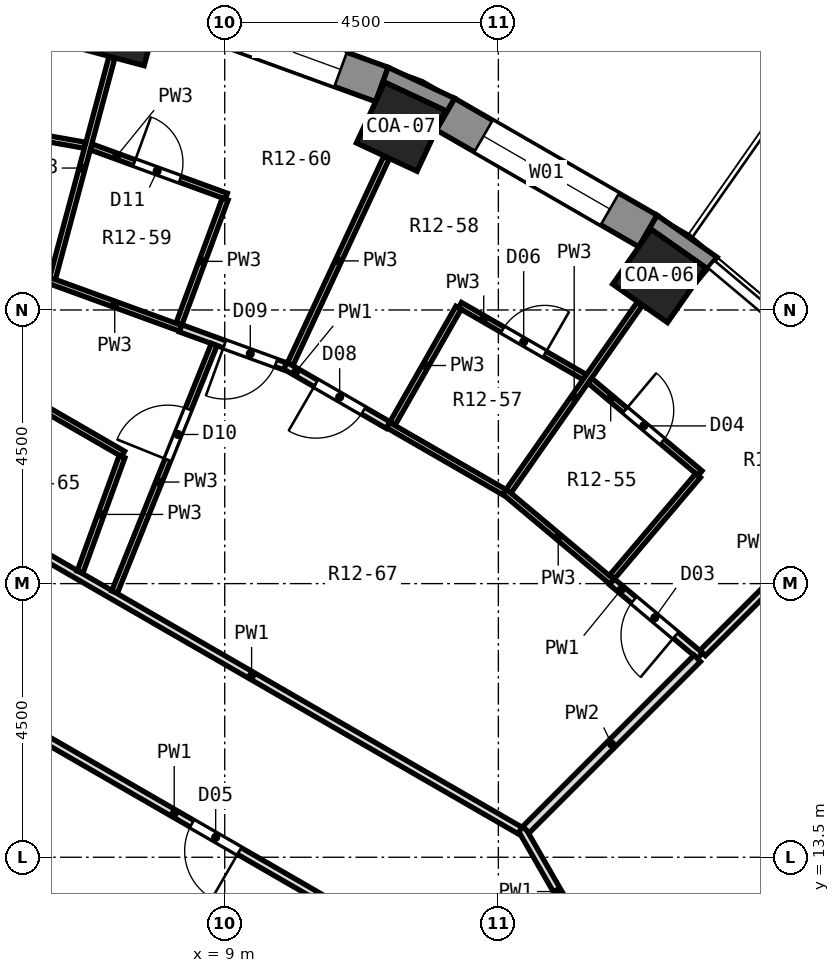
"""IFC4 building model, lengths in metres.
Left out: names, types, materials, properties, quantities, classifications, styles, units other than length and angle.
Written with IfcOpenShell. Run it as: python <this file> out.ifc"""

import sys

from ifc_helpers import new_model, si_unit, direction, frame, frame_2d, origin, origin_2d, place, context, subcontext, project, spatial, polyline, rectangle, outline, extrude, element, fill, save


model = new_model("IFC4")
c1 = context("Model", 3, precision=1e-05, world=origin(), true_north=direction((0.0, 1.0)))
c2 = subcontext(c1, "Body", "Model", "MODEL_VIEW")
j1 = project(units=[si_unit("LENGTHUNIT", "METRE"), si_unit("PLANEANGLEUNIT", "RADIAN")], contexts=[c1])
p1 = place(None, origin())
s1 = spatial("IfcSite", under=j1, at=p1, CompositionType="ELEMENT")
p2 = place(p1, origin())
s2 = spatial("IfcBuilding", under=s1, at=p2, CompositionType="ELEMENT")
p3 = place(p2, frame((0.0, 0.0, 56.0)))
s3 = spatial("IfcBuildingStorey", under=s2, at=p3, CompositionType="ELEMENT", Elevation=56.0)
for number, where, z_axis, x_axis in (
    (1, (16.146, 23.059, 0.0), (0.0, 0.0, 1.0), (0.574, 0.819, 0.0)),
    (2, (11.897, 25.512, 0.0), (0.0, 0.0, 1.0), (0.423, 0.906, 0.0)),
    (3, (7.286, 27.191, 0.0), (0.0, 0.0, 1.0), (0.259, 0.966, 0.0)),
):
    element("IfcColumn", number, at=place(p3, frame(where, z_axis=z_axis, x_axis=x_axis)), inside=s3, PredefinedType="COLUMN", context=c2, shape_type="SweptSolid", body=[
        extrude(rectangle(XDim=1.1, YDim=1.1, at=origin_2d()), origin(), (0.0, 0.0, 1.0), 3.3),
    ])
p4 = place(p3, frame((15.96, 23.798, 0.0), z_axis=(0.0, 0.0, 1.0), x_axis=(-0.86603124159, 0.499989888488, 0.0)))
e4 = element("IfcWall", 4, at=p4, inside=s3, PredefinedType="SOLIDWALL", context=c2, shape_type="SweptSolid", body=[
    extrude(rectangle(XDim=3.846, YDim=0.6, at=frame_2d((1.923, 0.0))), origin(), (0.0, 0.0, 1.0), 2.75),
])
p5 = place(p4, frame((0.723, 0.0, 0.9)))
e5 = element("IfcOpeningElement", 5, at=p5, cuts=e4, PredefinedType="OPENING", context=c2, shape_type="SweptSolid", body=[
    extrude(rectangle(XDim=2.4, YDim=1.8, at=frame_2d((1.2, 0.9))), frame((0.0, 0.312, 0.0), z_axis=(0.0, -1.0, 0.0), x_axis=(1.0, 0.0, 0.0)), (0.0, 0.0, 1.0), 0.624),
])
p6 = place(p3, frame((11.585, 26.208, 0.0), z_axis=(0.0, 0.0, 1.0), x_axis=(-0.939689588564, 0.342028474173, 0.0)))
e6 = element("IfcWall", 6, at=p6, inside=s3, PredefinedType="SOLIDWALL", context=c2, shape_type="SweptSolid", body=[
    extrude(rectangle(XDim=3.846, YDim=0.6, at=frame_2d((1.923, 0.0))), origin(), (0.0, 0.0, 1.0), 2.75),
])
p7 = place(p6, frame((0.723, 0.0, 0.9)))
e7 = element("IfcOpeningElement", 7, at=p7, cuts=e6, PredefinedType="OPENING", context=c2, shape_type="SweptSolid", body=[
    extrude(rectangle(XDim=2.4, YDim=1.8, at=frame_2d((1.2, 0.9))), frame((0.0, 0.312, 0.0), z_axis=(0.0, -1.0, 0.0), x_axis=(1.0, 0.0, 0.0)), (0.0, 0.0, 1.0), 0.624),
])
p8 = place(p3, origin())
e8 = element("IfcWall", 8, at=p8, inside=s3, PredefinedType="SOLIDWALL", context=c2, shape_type="SweptSolid", body=[
    extrude(outline(polyline([(17.097, 23.367), (16.11, 24.058), (15.81, 23.538), (16.011, 23.825), (16.912, 23.194), (16.711, 22.907), (17.097, 23.367)])), origin(), (0.0, 0.0, 1.0), 2.75),
])
p9 = place(p3, origin())
e9 = element("IfcWall", 9, at=p9, inside=s3, PredefinedType="SOLIDWALL", context=c2, shape_type="SweptSolid", body=[
    extrude(outline(polyline([(11.688, 26.49), (11.483, 25.926), (11.631, 26.243), (12.628, 25.779), (12.479, 25.461), (12.78, 25.981), (11.688, 26.49)])), origin(), (0.0, 0.0, 1.0), 2.75),
])
p10 = place(p3, frame((13.876, 13.976, 0.0), z_axis=(0.0, 0.0, 1.0), x_axis=(0.498306982451, -0.867000663921, 0.0)))
e10 = element("IfcWall", 10, at=p10, inside=s3, PredefinedType="PARTITIONING", context=c2, shape_type="SweptSolid", body=[
    extrude(rectangle(XDim=4.108, YDim=0.125, at=frame_2d((2.054, 0.0))), origin(), (0.0, 0.0, 1.0), 2.75),
])
p11 = place(p10, frame((1.623, 0.0, 0.0)))
e11 = element("IfcOpeningElement", 11, at=p11, cuts=e10, PredefinedType="OPENING", context=c2, shape_type="SweptSolid", body=[
    extrude(rectangle(XDim=1.0, YDim=2.1, at=frame_2d((0.5, 1.05))), frame((0.0, 0.074, 0.0), z_axis=(0.0, -1.0, 0.0), x_axis=(1.0, 0.0, 0.0)), (0.0, 0.0, 1.0), 0.149),
])
p12 = place(p3, frame((13.601, 19.513, 0.0), z_axis=(0.0, 0.0, 1.0), x_axis=(0.765838323525, -0.643033173499, 0.0)))
e12 = element("IfcWall", 12, at=p12, inside=s3, PredefinedType="PARTITIONING", context=c2, shape_type="SweptSolid", body=[
    extrude(rectangle(XDim=2.306, YDim=0.1, at=frame_2d((1.153, 0.0))), origin(), (0.0, 0.0, 1.0), 2.75),
])
p13 = place(p3, frame((15.367, 18.03, 0.0), z_axis=(0.0, 0.0, 1.0), x_axis=(0.766035589551, -0.64279816081, 0.0)))
e13 = element("IfcWall", 13, at=p13, inside=s3, PredefinedType="PARTITIONING", context=c2, shape_type="SweptSolid", body=[
    extrude(rectangle(XDim=1.89, YDim=0.125, at=frame_2d((0.945, 0.0))), origin(), (0.0, 0.0, 1.0), 2.75),
])
p14 = place(p13, frame((0.47, 0.0, 0.0)))
e14 = element("IfcOpeningElement", 14, at=p14, cuts=e13, PredefinedType="OPENING", context=c2, shape_type="SweptSolid", body=[
    extrude(rectangle(XDim=0.9, YDim=2.1, at=frame_2d((0.45, 1.05))), frame((0.0, 0.074, 0.0), z_axis=(0.0, -1.0, 0.0), x_axis=(1.0, 0.0, 0.0)), (0.0, 0.0, 1.0), 0.149),
])
p15 = place(p3, frame((15.002, 21.339, 0.0), z_axis=(0.0, 0.0, 1.0), x_axis=(0.765995095449, -0.642846415365, 0.0)))
e15 = element("IfcWall", 15, at=p15, inside=s3, PredefinedType="PARTITIONING", context=c2, shape_type="SweptSolid", body=[
    extrude(rectangle(XDim=2.369, YDim=0.1, at=frame_2d((1.185, 0.0))), origin(), (0.0, 0.0, 1.0), 2.75),
])
p16 = place(p15, frame((0.76, 0.0, 0.0)))
e16 = element("IfcOpeningElement", 16, at=p16, cuts=e15, PredefinedType="OPENING", context=c2, shape_type="SweptSolid", body=[
    extrude(rectangle(XDim=0.8, YDim=2.1, at=frame_2d((0.4, 1.05))), frame((0.0, 0.062, 0.0), z_axis=(0.0, -1.0, 0.0), x_axis=(1.0, 0.0, 0.0)), (0.0, 0.0, 1.0), 0.124),
])
p17 = place(p3, frame((4.332, 16.436, 0.0), z_axis=(0.0, 0.0, 1.0), x_axis=(0.866073188118, -0.499917225971, 0.0)))
e17 = element("IfcWall", 17, at=p17, inside=s3, PredefinedType="PARTITIONING", context=c2, shape_type="SweptSolid", body=[
    extrude(rectangle(XDim=8.861, YDim=0.125, at=frame_2d((4.431, 0.0))), origin(), (0.0, 0.0, 1.0), 2.75),
])
p18 = place(p17, frame((4.768, 0.0, 0.0)))
e18 = element("IfcOpeningElement", 18, at=p18, cuts=e17, PredefinedType="OPENING", context=c2, shape_type="SweptSolid", body=[
    extrude(rectangle(XDim=0.9, YDim=2.1, at=frame_2d((0.45, 1.05))), frame((0.0, 0.074, 0.0), z_axis=(0.0, -1.0, 0.0), x_axis=(1.0, 0.0, 0.0)), (0.0, 0.0, 1.0), 0.149),
])
p19 = place(p3, frame((5.029, 19.036, 0.0), z_axis=(0.0, 0.0, 1.0), x_axis=(0.866024825845, -0.50000100102, 0.0)))
e19 = element("IfcWall", 19, at=p19, inside=s3, PredefinedType="PARTITIONING", context=c2, shape_type="SweptSolid", body=[
    extrude(rectangle(XDim=10.192, YDim=0.125, at=frame_2d((5.096, 0.0))), origin(), (0.0, 0.0, 1.0), 2.75),
])
p20 = place(p3, frame((5.604, 21.129, 0.0), z_axis=(0.0, 0.0, 1.0), x_axis=(0.865901665176, -0.500214260339, 0.0)))
e20 = element("IfcWall", 20, at=p20, inside=s3, PredefinedType="PARTITIONING", context=c2, shape_type="SweptSolid", body=[
    extrude(rectangle(XDim=1.991, YDim=0.1, at=frame_2d((0.996, 0.0))), origin(), (0.0, 0.0, 1.0), 2.75),
])
p21 = place(p3, frame((11.687, 20.607, 0.0), z_axis=(0.0, 0.0, 1.0), x_axis=(0.866150561987, -0.499783156949, 0.0)))
e21 = element("IfcWall", 21, at=p21, inside=s3, PredefinedType="PARTITIONING", context=c2, shape_type="SweptSolid", body=[
    extrude(rectangle(XDim=2.205, YDim=0.1, at=frame_2d((1.103, 0.0))), origin(), (0.0, 0.0, 1.0), 2.75),
])
p22 = place(p3, frame((9.995, 21.584, 0.0), z_axis=(0.0, 0.0, 1.0), x_axis=(0.865996179119, -0.50005061519, 0.0)))
e22 = element("IfcWall", 22, at=p22, inside=s3, PredefinedType="PARTITIONING", context=c2, shape_type="SweptSolid", body=[
    extrude(rectangle(XDim=1.953, YDim=0.125, at=frame_2d((0.977, 0.0))), origin(), (0.0, 0.0, 1.0), 2.75),
])
p23 = place(p22, frame((0.583, 0.0, 0.0)))
e23 = element("IfcOpeningElement", 23, at=p23, cuts=e22, PredefinedType="OPENING", context=c2, shape_type="SweptSolid", body=[
    extrude(rectangle(XDim=0.9, YDim=2.1, at=frame_2d((0.45, 1.05))), frame((0.0, 0.074, 0.0), z_axis=(0.0, -1.0, 0.0), x_axis=(1.0, 0.0, 0.0)), (0.0, 0.0, 1.0), 0.149),
])
p24 = place(p3, frame((12.869, 22.58, 0.0), z_axis=(0.0, 0.0, 1.0), x_axis=(0.866116947413, -0.499841408252, 0.0)))
e24 = element("IfcWall", 24, at=p24, inside=s3, PredefinedType="PARTITIONING", context=c2, shape_type="SweptSolid", body=[
    extrude(rectangle(XDim=2.369, YDim=0.1, at=frame_2d((1.185, 0.0))), origin(), (0.0, 0.0, 1.0), 2.75),
])
p25 = place(p24, frame((0.809, 0.0, 0.0)))
e25 = element("IfcOpeningElement", 25, at=p25, cuts=e24, PredefinedType="OPENING", context=c2, shape_type="SweptSolid", body=[
    extrude(rectangle(XDim=0.8, YDim=2.1, at=frame_2d((0.4, 1.05))), frame((0.0, 0.062, 0.0), z_axis=(0.0, -1.0, 0.0), x_axis=(1.0, 0.0, 0.0)), (0.0, 0.0, 1.0), 0.124),
])
p26 = place(p3, frame((6.107, 22.987, 0.0), z_axis=(0.0, 0.0, 1.0), x_axis=(0.939734670151, -0.34190459154, 0.0)))
e26 = element("IfcWall", 26, at=p26, inside=s3, PredefinedType="PARTITIONING", context=c2, shape_type="SweptSolid", body=[
    extrude(rectangle(XDim=2.306, YDim=0.1, at=frame_2d((1.153, 0.0))), origin(), (0.0, 0.0, 1.0), 2.75),
])
p27 = place(p3, frame((8.274, 22.199, 0.0), z_axis=(0.0, 0.0, 1.0), x_axis=(0.939613884944, -0.342236390848, 0.0)))
e27 = element("IfcWall", 27, at=p27, inside=s3, PredefinedType="PARTITIONING", context=c2, shape_type="SweptSolid", body=[
    extrude(rectangle(XDim=1.828, YDim=0.125, at=frame_2d((0.914, 0.0))), origin(), (0.0, 0.0, 1.0), 2.75),
])
p28 = place(p27, frame((0.77, 0.0, 0.0)))
e28 = element("IfcOpeningElement", 28, at=p28, cuts=e27, PredefinedType="OPENING", context=c2, shape_type="SweptSolid", body=[
    extrude(rectangle(XDim=0.9, YDim=2.1, at=frame_2d((0.45, 1.05))), frame((0.0, 0.074, 0.0), z_axis=(0.0, -1.0, 0.0), x_axis=(1.0, 0.0, 0.0)), (0.0, 0.0, 1.0), 0.149),
])
p29 = place(p3, frame((6.799, 25.183, 0.0), z_axis=(0.0, 0.0, 1.0), x_axis=(0.939651971579, -0.342131805461, 0.0)))
e29 = element("IfcWall", 29, at=p29, inside=s3, PredefinedType="PARTITIONING", context=c2, shape_type="SweptSolid", body=[
    extrude(rectangle(XDim=2.37, YDim=0.1, at=frame_2d((1.185, 0.0))), origin(), (0.0, 0.0, 1.0), 2.75),
])
p30 = place(p29, frame((0.76, 0.0, 0.0)))
e30 = element("IfcOpeningElement", 30, at=p30, cuts=e29, PredefinedType="OPENING", context=c2, shape_type="SweptSolid", body=[
    extrude(rectangle(XDim=0.8, YDim=2.1, at=frame_2d((0.4, 1.05))), frame((0.0, 0.062, 0.0), z_axis=(0.0, -1.0, 0.0), x_axis=(1.0, 0.0, 0.0)), (0.0, 0.0, 1.0), 0.124),
])
p31 = place(p3, frame((4.37, 25.62, 0.0), z_axis=(0.0, 0.0, 1.0), x_axis=(0.984804303523, -0.173667739554, 0.0)))
e31 = element("IfcWall", 31, at=p31, inside=s3, PredefinedType="PARTITIONING", context=c2, shape_type="SweptSolid", body=[
    extrude(rectangle(XDim=2.369, YDim=0.1, at=frame_2d((1.184, 0.0))), origin(), (0.0, 0.0, 1.0), 2.75),
])
p32 = place(p31, frame((0.809, 0.0, 0.0)))
e32 = element("IfcOpeningElement", 32, at=p32, cuts=e31, PredefinedType="OPENING", context=c2, shape_type="SweptSolid", body=[
    extrude(rectangle(XDim=0.8, YDim=2.1, at=frame_2d((0.4, 1.05))), frame((0.0, 0.062, 0.0), z_axis=(0.0, -1.0, 0.0), x_axis=(1.0, 0.0, 0.0)), (0.0, 0.0, 1.0), 0.124),
])
p33 = place(p3, frame((16.859, 16.859, 0.0), z_axis=(0.0, 0.0, 1.0), x_axis=(0.707106781187, 0.707106781187, 0.0)))
e33 = element("IfcWall", 33, at=p33, inside=s3, PredefinedType="PARTITIONING", context=c2, shape_type="SweptSolid", body=[
    extrude(rectangle(XDim=3.748, YDim=0.125, at=frame_2d((1.874, 0.0))), origin(), (0.0, 0.0, 1.0), 2.75),
])
p34 = place(p3, frame((13.953, 13.953, 0.0), z_axis=(0.0, 0.0, 1.0), x_axis=(0.707106781187, 0.707106781187, 0.0)))
e34 = element("IfcWall", 34, at=p34, inside=s3, PredefinedType="PARTITIONING", context=c2, shape_type="SweptSolid", body=[
    extrude(rectangle(XDim=3.985, YDim=0.15, at=frame_2d((1.992, 0.0))), origin(), (0.0, 0.0, 1.0), 2.75),
])
p35 = place(p3, frame((15.369, 18.11, 0.0), z_axis=(0.0, 0.0, 1.0), x_axis=(0.646932224045, 0.762547505072, 0.0)))
e35 = element("IfcWall", 35, at=p35, inside=s3, PredefinedType="PARTITIONING", context=c2, shape_type="SweptSolid", body=[
    extrude(rectangle(XDim=2.188, YDim=0.1, at=frame_2d((1.094, 0.0))), origin(), (0.0, 0.0, 1.0), 2.75),
])
p36 = place(p3, frame((13.669, 19.521, 0.0), z_axis=(0.0, 0.0, 1.0), x_axis=(0.573558226361, 0.81916479476, 0.0)))
e36 = element("IfcWall", 36, at=p36, inside=s3, PredefinedType="PARTITIONING", context=c2, shape_type="SweptSolid", body=[
    extrude(rectangle(XDim=3.76, YDim=0.1, at=frame_2d((1.88, 0.0))), origin(), (0.0, 0.0, 1.0), 2.75),
])
p37 = place(p3, frame((11.761, 20.636, 0.0), z_axis=(0.0, 0.0, 1.0), x_axis=(0.495213152806, 0.868771508101, 0.0)))
e37 = element("IfcWall", 37, at=p37, inside=s3, PredefinedType="PARTITIONING", context=c2, shape_type="SweptSolid", body=[
    extrude(rectangle(XDim=2.188, YDim=0.1, at=frame_2d((1.094, 0.0))), origin(), (0.0, 0.0, 1.0), 2.75),
])
p38 = place(p3, frame((10.077, 21.608, 0.0), z_axis=(0.0, 0.0, 1.0), x_axis=(0.422418199687, 0.906401050624, 0.0)))
e38 = element("IfcWall", 38, at=p38, inside=s3, PredefinedType="PARTITIONING", context=c2, shape_type="SweptSolid", body=[
    extrude(rectangle(XDim=3.748, YDim=0.1, at=frame_2d((1.874, 0.0))), origin(), (0.0, 0.0, 1.0), 2.75),
])
p39 = place(p3, frame((7.188, 17.861, 0.0), z_axis=(0.0, 0.0, 1.0), x_axis=(0.373452567141, 0.927649276449, 0.0)))
e39 = element("IfcWall", 39, at=p39, inside=s3, PredefinedType="PARTITIONING", context=c2, shape_type="SweptSolid", body=[
    extrude(rectangle(XDim=4.387, YDim=0.1, at=frame_2d((2.194, 0.0))), origin(), (0.0, 0.0, 1.0), 2.75),
])
p40 = place(p39, frame((2.344, 0.0, 0.0)))
e40 = element("IfcOpeningElement", 40, at=p40, cuts=e39, PredefinedType="OPENING", context=c2, shape_type="SweptSolid", body=[
    extrude(rectangle(XDim=0.9, YDim=2.1, at=frame_2d((0.45, 1.05))), frame((0.0, 0.062, 0.0), z_axis=(0.0, -1.0, 0.0), x_axis=(1.0, 0.0, 0.0)), (0.0, 0.0, 1.0), 0.124),
])
p41 = place(p3, frame((8.249, 22.275, 0.0), z_axis=(0.0, 0.0, 1.0), x_axis=(0.347437983371, 0.937702963476, 0.0)))
e41 = element("IfcWall", 41, at=p41, inside=s3, PredefinedType="PARTITIONING", context=c2, shape_type="SweptSolid", body=[
    extrude(rectangle(XDim=2.187, YDim=0.1, at=frame_2d((1.093, 0.0))), origin(), (0.0, 0.0, 1.0), 2.75),
])
p42 = place(p3, frame((6.62, 18.189, 0.0), z_axis=(0.0, 0.0, 1.0), x_axis=(0.341976076059, 0.939708658789, 0.0)))
e42 = element("IfcWall", 42, at=p42, inside=s3, PredefinedType="PARTITIONING", context=c2, shape_type="SweptSolid", body=[
    extrude(rectangle(XDim=2.019, YDim=0.1, at=frame_2d((1.01, 0.0))), origin(), (0.0, 0.0, 1.0), 2.75),
])
p43 = place(p3, frame((6.168, 23.018, 0.0), z_axis=(0.0, 0.0, 1.0), x_axis=(0.259367918518, 0.965778588934, 0.0)))
e43 = element("IfcWall", 43, at=p43, inside=s3, PredefinedType="PARTITIONING", context=c2, shape_type="SweptSolid", body=[
    extrude(rectangle(XDim=3.76, YDim=0.1, at=frame_2d((1.88, 0.0))), origin(), (0.0, 0.0, 1.0), 2.75),
])
p44 = place(p5, origin())
e44 = element("IfcWindow", 44, at=p44, inside=s3, PartitioningType="SINGLE_PANEL", PredefinedType="WINDOW", context=c2, shape_type="SweptSolid", body=[
    extrude(rectangle(XDim=2.4, YDim=1.8, at=frame_2d((1.2, 0.9))), frame((0.0, 0.18, 0.0), z_axis=(0.0, -1.0, 0.0), x_axis=(1.0, 0.0, 0.0)), (0.0, 0.0, 1.0), 0.06),
])
fill(e5, e44)
p45 = place(p7, origin())
e45 = element("IfcWindow", 45, at=p45, inside=s3, PartitioningType="SINGLE_PANEL", PredefinedType="WINDOW", context=c2, shape_type="SweptSolid", body=[
    extrude(rectangle(XDim=2.4, YDim=1.8, at=frame_2d((1.2, 0.9))), frame((0.0, 0.18, 0.0), z_axis=(0.0, -1.0, 0.0), x_axis=(1.0, 0.0, 0.0)), (0.0, 0.0, 1.0), 0.06),
])
fill(e7, e45)
p46 = place(p14, frame((0.9, 0.0, 0.0), z_axis=(0.0, 0.0, 1.0), x_axis=(-1.0, 0.0, 0.0)))
e46 = element("IfcDoor", 46, at=p46, inside=s3, OperationType="SINGLE_SWING_LEFT", PredefinedType="DOOR", context=c2, shape_type="SweptSolid", body=[
    extrude(rectangle(XDim=0.9, YDim=2.1, at=frame_2d((0.45, 1.05))), frame((0.0, 0.025, 0.0), z_axis=(0.0, -1.0, 0.0), x_axis=(1.0, 0.0, 0.0)), (0.0, 0.0, 1.0), 0.05),
])
fill(e14, e46)
p47 = place(p16, origin())
e47 = element("IfcDoor", 47, at=p47, inside=s3, OperationType="SINGLE_SWING_LEFT", PredefinedType="DOOR", context=c2, shape_type="SweptSolid", body=[
    extrude(rectangle(XDim=0.8, YDim=2.1, at=frame_2d((0.4, 1.05))), frame((0.0, 0.025, 0.0), z_axis=(0.0, -1.0, 0.0), x_axis=(1.0, 0.0, 0.0)), (0.0, 0.0, 1.0), 0.05),
])
fill(e16, e47)
p48 = place(p18, frame((0.9, 0.0, 0.0), z_axis=(0.0, 0.0, 1.0), x_axis=(-1.0, 0.0, 0.0)))
e48 = element("IfcDoor", 48, at=p48, inside=s3, OperationType="SINGLE_SWING_LEFT", PredefinedType="DOOR", context=c2, shape_type="SweptSolid", body=[
    extrude(rectangle(XDim=0.9, YDim=2.1, at=frame_2d((0.45, 1.05))), frame((0.0, 0.025, 0.0), z_axis=(0.0, -1.0, 0.0), x_axis=(1.0, 0.0, 0.0)), (0.0, 0.0, 1.0), 0.05),
])
fill(e18, e48)
p49 = place(p25, origin())
e49 = element("IfcDoor", 49, at=p49, inside=s3, OperationType="SINGLE_SWING_RIGHT", PredefinedType="DOOR", context=c2, shape_type="SweptSolid", body=[
    extrude(rectangle(XDim=0.8, YDim=2.1, at=frame_2d((0.4, 1.05))), frame((0.0, 0.025, 0.0), z_axis=(0.0, -1.0, 0.0), x_axis=(1.0, 0.0, 0.0)), (0.0, 0.0, 1.0), 0.05),
])
fill(e25, e49)
p50 = place(p23, frame((0.9, 0.0, 0.0), z_axis=(0.0, 0.0, 1.0), x_axis=(-1.0, 0.0, 0.0)))
e50 = element("IfcDoor", 50, at=p50, inside=s3, OperationType="SINGLE_SWING_RIGHT", PredefinedType="DOOR", context=c2, shape_type="SweptSolid", body=[
    extrude(rectangle(XDim=0.9, YDim=2.1, at=frame_2d((0.45, 1.05))), frame((0.0, 0.025, 0.0), z_axis=(0.0, -1.0, 0.0), x_axis=(1.0, 0.0, 0.0)), (0.0, 0.0, 1.0), 0.05),
])
fill(e23, e50)
p51 = place(p28, frame((0.9, 0.0, 0.0), z_axis=(0.0, 0.0, 1.0), x_axis=(-1.0, 0.0, 0.0)))
e51 = element("IfcDoor", 51, at=p51, inside=s3, OperationType="SINGLE_SWING_RIGHT", PredefinedType="DOOR", context=c2, shape_type="SweptSolid", body=[
    extrude(rectangle(XDim=0.9, YDim=2.1, at=frame_2d((0.45, 1.05))), frame((0.0, 0.025, 0.0), z_axis=(0.0, -1.0, 0.0), x_axis=(1.0, 0.0, 0.0)), (0.0, 0.0, 1.0), 0.05),
])
fill(e28, e51)
p52 = place(p40, origin())
e52 = element("IfcDoor", 52, at=p52, inside=s3, OperationType="SINGLE_SWING_LEFT", PredefinedType="DOOR", context=c2, shape_type="SweptSolid", body=[
    extrude(rectangle(XDim=0.9, YDim=2.1, at=frame_2d((0.45, 1.05))), frame((0.0, 0.025, 0.0), z_axis=(0.0, -1.0, 0.0), x_axis=(1.0, 0.0, 0.0)), (0.0, 0.0, 1.0), 0.05),
])
fill(e40, e52)
p53 = place(p30, origin())
e53 = element("IfcDoor", 53, at=p53, inside=s3, OperationType="SINGLE_SWING_LEFT", PredefinedType="DOOR", context=c2, shape_type="SweptSolid", body=[
    extrude(rectangle(XDim=0.8, YDim=2.1, at=frame_2d((0.4, 1.05))), frame((0.0, 0.025, 0.0), z_axis=(0.0, -1.0, 0.0), x_axis=(1.0, 0.0, 0.0)), (0.0, 0.0, 1.0), 0.05),
])
fill(e30, e53)
save(model, sys.argv[1])
